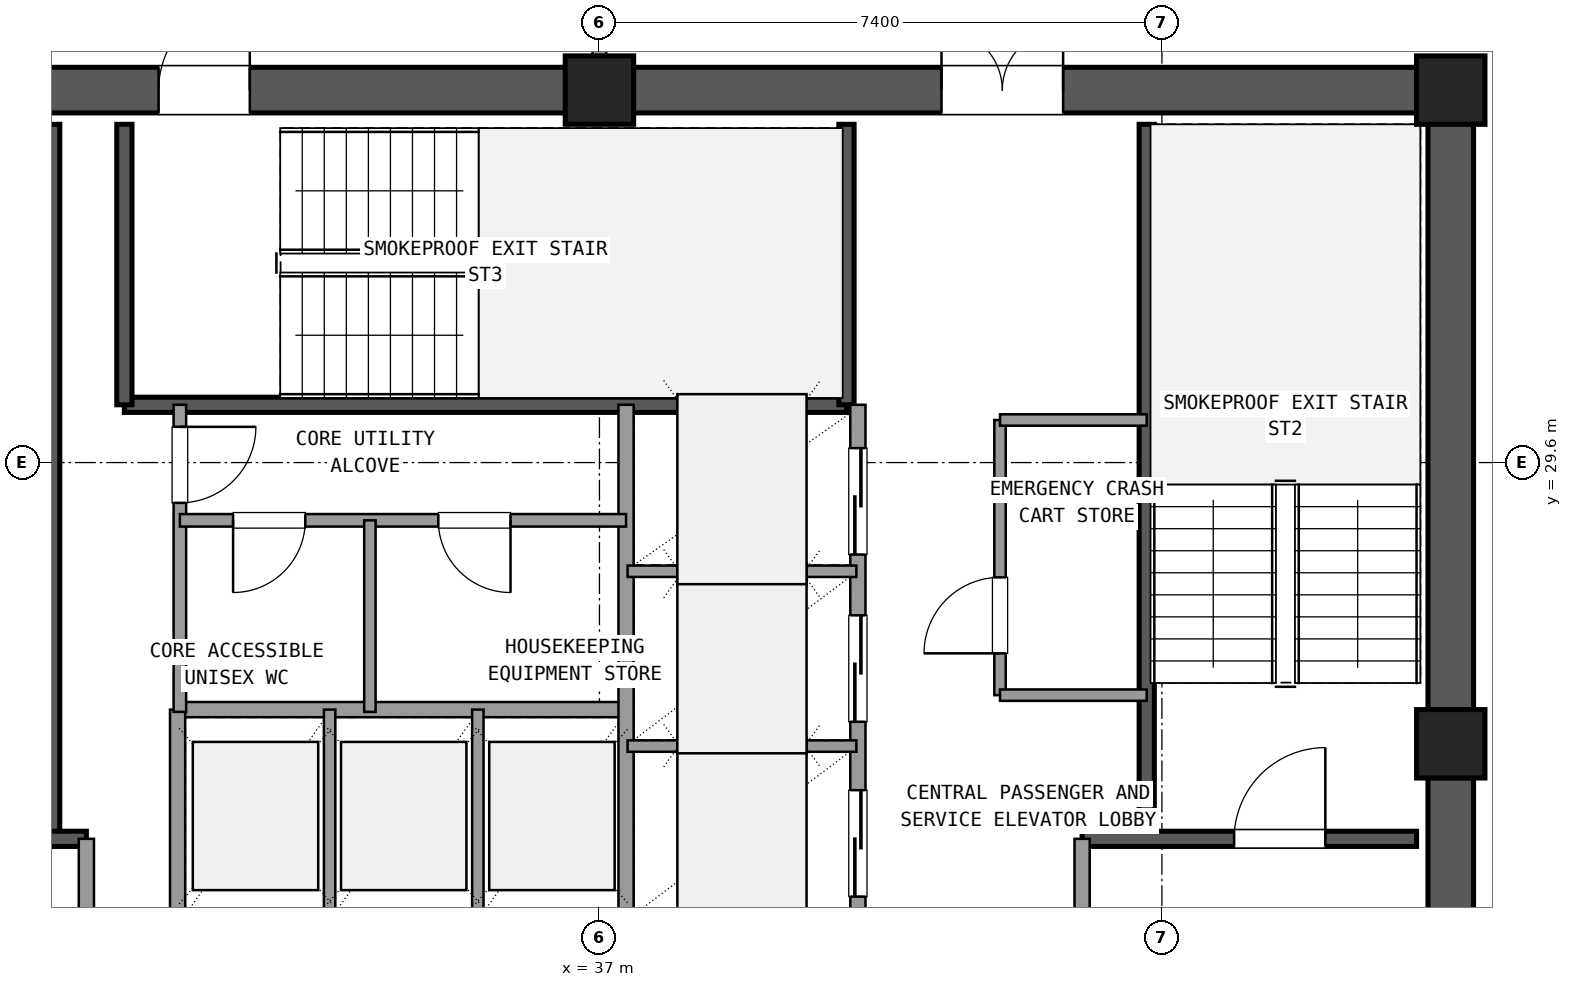
"""IFC4 building model, lengths in metres.
Left out: names, types, materials, properties, quantities, classifications, styles, units other than length and angle.
Written with IfcOpenShell. Run it as: python <this file> out.ifc"""

import sys

from ifc_helpers import new_model, si_unit, direction, frame, frame_2d, origin, origin_2d, place, context, subcontext, project, spatial, rectangle, extrude, element, fill, save


model = new_model("IFC4")
c1 = context("Model", 3, precision=1e-05, world=origin(), true_north=direction((0.0, 1.0)))
c2 = subcontext(c1, "Body", "Model", "MODEL_VIEW")
j1 = project(units=[si_unit("LENGTHUNIT", "METRE"), si_unit("PLANEANGLEUNIT", "RADIAN")], contexts=[c1])
p1 = place(None, origin())
s1 = spatial("IfcSite", under=j1, at=p1, CompositionType="ELEMENT")
p2 = place(p1, origin())
s2 = spatial("IfcBuilding", under=s1, at=p2, CompositionType="ELEMENT")
p3 = place(p2, frame((0.0, 0.0, 196.38)))
s3 = spatial("IfcBuildingStorey", under=s2, at=p3, CompositionType="ELEMENT", Elevation=196.38)
for number, where, z_axis, x_axis in (
    (1, (48.2, 25.9, 0.0), (0.0, 0.0, 1.0), (1.0, 0.0, 0.0)),
    (2, (48.2, 34.5, 0.0), (0.0, 0.0, 1.0), (1.0, 0.0, 0.0)),
    (3, (37.0, 34.5, 0.0), (0.0, 0.0, 1.0), (1.0, 0.0, 0.0)),
):
    element("IfcColumn", number, at=place(p3, frame(where, z_axis=z_axis, x_axis=x_axis)), inside=s3, PredefinedType="COLUMN", context=c2, shape_type="SweptSolid", body=[
        extrude(rectangle(XDim=0.9, YDim=0.9, at=origin_2d()), origin(), (0.0, 0.0, 1.0), 3.6),
    ])
p4 = place(p3, frame((48.2, 17.745, 0.0), z_axis=(0.0, 0.0, 1.0), x_axis=(0.0, 1.0, 0.0)))
e4 = element("IfcWall", 4, at=p4, inside=s3, PredefinedType="SHEAR", context=c2, shape_type="SweptSolid", body=[
    extrude(rectangle(XDim=7.71, YDim=0.6, at=frame_2d((3.855, 0.0))), origin(), (0.0, 0.0, 1.0), 3.32),
])
p5 = place(p4, frame((4.305, 0.0, 0.0)))
e5 = element("IfcOpeningElement", 5, at=p5, cuts=e4, PredefinedType="OPENING", context=c2, shape_type="SweptSolid", body=[
    extrude(rectangle(XDim=1.2, YDim=2.15, at=frame_2d((0.6, 1.075))), frame((0.0, 0.31, 0.0), z_axis=(0.0, -1.0, 0.0), x_axis=(1.0, 0.0, 0.0)), (0.0, 0.0, 1.0), 0.62),
])
p6 = place(p3, frame((48.2, 26.345, 0.0), z_axis=(0.0, 0.0, 1.0), x_axis=(0.0, 1.0, 0.0)))
e6 = element("IfcWall", 6, at=p6, inside=s3, PredefinedType="SHEAR", context=c2, shape_type="SweptSolid", body=[
    extrude(rectangle(XDim=7.71, YDim=0.6, at=frame_2d((3.855, 0.0))), origin(), (0.0, 0.0, 1.0), 3.32),
])
p7 = place(p3, frame((47.755, 34.5, 0.0), z_axis=(0.0, 0.0, 1.0), x_axis=(-1.0, 0.0, 0.0)))
e7 = element("IfcWall", 7, at=p7, inside=s3, PredefinedType="SHEAR", context=c2, shape_type="SweptSolid", body=[
    extrude(rectangle(XDim=10.31, YDim=0.6, at=frame_2d((5.155, 0.0))), origin(), (0.0, 0.0, 1.0), 3.32),
])
p8 = place(p7, frame((4.655, 0.0, 0.0)))
e8 = element("IfcOpeningElement", 8, at=p8, cuts=e7, PredefinedType="OPENING", context=c2, shape_type="SweptSolid", body=[
    extrude(rectangle(XDim=1.6, YDim=2.2, at=frame_2d((0.8, 1.1))), frame((0.0, 0.31, 0.0), z_axis=(0.0, -1.0, 0.0), x_axis=(1.0, 0.0, 0.0)), (0.0, 0.0, 1.0), 0.62),
])
p9 = place(p3, frame((36.555, 34.5, 0.0), z_axis=(0.0, 0.0, 1.0), x_axis=(-1.0, 0.0, 0.0)))
e9 = element("IfcWall", 9, at=p9, inside=s3, PredefinedType="SHEAR", context=c2, shape_type="SweptSolid", body=[
    extrude(rectangle(XDim=10.31, YDim=0.6, at=frame_2d((5.155, 0.0))), origin(), (0.0, 0.0, 1.0), 3.32),
])
p10 = place(p9, frame((4.155, 0.0, 0.0)))
e10 = element("IfcOpeningElement", 10, at=p10, cuts=e9, PredefinedType="OPENING", context=c2, shape_type="SweptSolid", body=[
    extrude(rectangle(XDim=1.2, YDim=2.15, at=frame_2d((0.6, 1.075))), frame((0.0, 0.31, 0.0), z_axis=(0.0, -1.0, 0.0), x_axis=(1.0, 0.0, 0.0)), (0.0, 0.0, 1.0), 0.62),
])
p11 = place(p3, frame((29.8, 24.65, 0.0), z_axis=(0.0, 0.0, 1.0), x_axis=(0.0, 1.0, 0.0)))
e11 = element("IfcWall", 11, at=p11, inside=s3, PredefinedType="SHEAR", context=c2, shape_type="SweptSolid", body=[
    extrude(rectangle(XDim=9.4, YDim=0.2, at=frame_2d((4.7, 0.0))), origin(), (0.0, 0.0, 1.0), 3.32),
])
p12 = place(p3, frame((26.25, 24.65, 0.0), z_axis=(0.0, 0.0, 1.0), x_axis=(1.0, 0.0, 0.0)))
e12 = element("IfcWall", 12, at=p12, inside=s3, PredefinedType="SHEAR", context=c2, shape_type="SweptSolid", body=[
    extrude(rectangle(XDim=4.0, YDim=0.2, at=frame_2d((2.0, 0.0))), origin(), (0.0, 0.0, 1.0), 3.32),
])
p13 = place(p12, frame((1.0, 0.0, 0.0)))
e13 = element("IfcOpeningElement", 13, at=p13, cuts=e12, PredefinedType="OPENING", context=c2, shape_type="SweptSolid", body=[
    extrude(rectangle(XDim=1.2, YDim=2.15, at=frame_2d((0.6, 1.075))), frame((0.0, 0.11, 0.0), z_axis=(0.0, -1.0, 0.0), x_axis=(1.0, 0.0, 0.0)), (0.0, 0.0, 1.0), 0.22),
])
p14 = place(p3, frame((44.2, 24.65, 0.0), z_axis=(0.0, 0.0, 1.0), x_axis=(0.0, 1.0, 0.0)))
e14 = element("IfcWall", 14, at=p14, inside=s3, PredefinedType="SHEAR", context=c2, shape_type="SweptSolid", body=[
    extrude(rectangle(XDim=9.4, YDim=0.2, at=frame_2d((4.7, 0.0))), origin(), (0.0, 0.0, 1.0), 3.32),
])
p15 = place(p3, frame((43.35, 24.65, 0.0), z_axis=(0.0, 0.0, 1.0), x_axis=(1.0, 0.0, 0.0)))
e15 = element("IfcWall", 15, at=p15, inside=s3, PredefinedType="SHEAR", context=c2, shape_type="SweptSolid", body=[
    extrude(rectangle(XDim=4.4, YDim=0.2, at=frame_2d((2.2, 0.0))), origin(), (0.0, 0.0, 1.0), 3.32),
])
p16 = place(p15, frame((2.0, 0.0, 0.0)))
e16 = element("IfcOpeningElement", 16, at=p16, cuts=e15, PredefinedType="OPENING", context=c2, shape_type="SweptSolid", body=[
    extrude(rectangle(XDim=1.2, YDim=2.15, at=frame_2d((0.6, 1.075))), frame((0.0, 0.11, 0.0), z_axis=(0.0, -1.0, 0.0), x_axis=(1.0, 0.0, 0.0)), (0.0, 0.0, 1.0), 0.22),
])
p17 = place(p3, frame((30.75, 30.36, 0.0), z_axis=(0.0, 0.0, 1.0), x_axis=(1.0, 0.0, 0.0)))
e17 = element("IfcWall", 17, at=p17, inside=s3, PredefinedType="SHEAR", context=c2, shape_type="SweptSolid", body=[
    extrude(rectangle(XDim=9.5, YDim=0.2, at=frame_2d((4.75, 0.0))), origin(), (0.0, 0.0, 1.0), 3.32),
])
for number, where, z_axis, x_axis in (
    (18, (30.75, 30.36, 0.0), (0.0, 0.0, 1.0), (0.0, 1.0, 0.0)),
    (19, (40.25, 30.36, 0.0), (0.0, 0.0, 1.0), (0.0, 1.0, 0.0)),
):
    element("IfcWall", number, at=place(p3, frame(where, z_axis=z_axis, x_axis=x_axis)), inside=s3, PredefinedType="SHEAR", context=c2, shape_type="SweptSolid", body=[
        extrude(rectangle(XDim=3.69, YDim=0.2, at=frame_2d((1.845, 0.0))), origin(), (0.0, 0.0, 1.0), 3.32),
    ])
p18 = place(p3, frame((30.25, 17.75, 0.0), z_axis=(0.0, 0.0, 1.0), x_axis=(0.0, 1.0, 0.0)))
e20 = element("IfcWall", 20, at=p18, inside=s3, PredefinedType="SOLIDWALL", context=c2, shape_type="SweptSolid", body=[
    extrude(rectangle(XDim=6.9, YDim=0.2, at=frame_2d((3.45, 0.0))), origin(), (0.0, 0.0, 1.0), 2.61),
])
p19 = place(p18, frame((4.15, 0.0, 0.0)))
e21 = element("IfcOpeningElement", 21, at=p19, cuts=e20, PredefinedType="OPENING", context=c2, shape_type="SweptSolid", body=[
    extrude(rectangle(XDim=1.2, YDim=2.15, at=frame_2d((0.6, 1.075))), frame((0.0, 0.11, 0.0), z_axis=(0.0, -1.0, 0.0), x_axis=(1.0, 0.0, 0.0)), (0.0, 0.0, 1.0), 0.22),
])
p20 = place(p3, frame((43.35, 17.75, 0.0), z_axis=(0.0, 0.0, 1.0), x_axis=(0.0, 1.0, 0.0)))
e22 = element("IfcWall", 22, at=p20, inside=s3, PredefinedType="SOLIDWALL", context=c2, shape_type="SweptSolid", body=[
    extrude(rectangle(XDim=6.9, YDim=0.2, at=frame_2d((3.45, 0.0))), origin(), (0.0, 0.0, 1.0), 2.61),
])
p21 = place(p20, frame((4.15, 0.0, 0.0)))
e23 = element("IfcOpeningElement", 23, at=p21, cuts=e22, PredefinedType="OPENING", context=c2, shape_type="SweptSolid", body=[
    extrude(rectangle(XDim=1.2, YDim=2.15, at=frame_2d((0.6, 1.075))), frame((0.0, 0.11, 0.0), z_axis=(0.0, -1.0, 0.0), x_axis=(1.0, 0.0, 0.0)), (0.0, 0.0, 1.0), 0.22),
])
p22 = place(p3, frame((31.45, 26.35, 0.0), z_axis=(0.0, 0.0, 1.0), x_axis=(1.0, 0.0, 0.0)))
e24 = element("IfcWall", 24, at=p22, inside=s3, PredefinedType="SOLIDWALL", context=c2, shape_type="SweptSolid", body=[
    extrude(rectangle(XDim=5.9, YDim=0.2, at=frame_2d((2.95, 0.0))), origin(), (0.0, 0.0, 1.0), 2.61),
])
p23 = place(p3, frame((31.45, 23.54, 0.0), z_axis=(0.0, 0.0, 1.0), x_axis=(0.0, 1.0, 0.0)))
e25 = element("IfcWall", 25, at=p23, inside=s3, PredefinedType="SOLIDWALL", context=c2, shape_type="SweptSolid", body=[
    extrude(rectangle(XDim=2.81, YDim=0.2, at=frame_2d((1.405, 0.0))), origin(), (0.0, 0.0, 1.0), 2.61),
])
for number, where, z_axis, x_axis in (
    (26, (33.45, 23.54, 0.0), (0.0, 0.0, 1.0), (0.0, 1.0, 0.0)),
    (27, (35.4, 23.54, 0.0), (0.0, 0.0, 1.0), (0.0, 1.0, 0.0)),
):
    element("IfcWall", number, at=place(p3, frame(where, z_axis=z_axis, x_axis=x_axis)), inside=s3, PredefinedType="PARTITIONING", context=c2, shape_type="SweptSolid", body=[
        extrude(rectangle(XDim=2.81, YDim=0.15, at=frame_2d((1.405, 0.0))), origin(), (0.0, 0.0, 1.0), 2.61),
    ])
p24 = place(p3, frame((37.35, 23.54, 0.0), z_axis=(0.0, 0.0, 1.0), x_axis=(0.0, 1.0, 0.0)))
e28 = element("IfcWall", 28, at=p24, inside=s3, PredefinedType="SOLIDWALL", context=c2, shape_type="SweptSolid", body=[
    extrude(rectangle(XDim=6.82, YDim=0.2, at=frame_2d((3.41, 0.0))), origin(), (0.0, 0.0, 1.0), 2.61),
])
p25 = place(p3, frame((40.4, 23.54, 0.0), z_axis=(0.0, 0.0, 1.0), x_axis=(0.0, 1.0, 0.0)))
e29 = element("IfcWall", 29, at=p25, inside=s3, PredefinedType="SOLIDWALL", context=c2, shape_type="SweptSolid", body=[
    extrude(rectangle(XDim=6.82, YDim=0.2, at=frame_2d((3.41, 0.0))), origin(), (0.0, 0.0, 1.0), 2.61),
])
p26 = place(p25, frame((0.35, 0.0, 0.0)))
e30 = element("IfcOpeningElement", 30, at=p26, cuts=e29, PredefinedType="OPENING", context=c2, shape_type="SweptSolid", body=[
    extrude(rectangle(XDim=1.4, YDim=2.2, at=frame_2d((0.7, 1.1))), frame((0.0, 0.11, 0.0), z_axis=(0.0, -1.0, 0.0), x_axis=(1.0, 0.0, 0.0)), (0.0, 0.0, 1.0), 0.22),
])
p27 = place(p25, frame((2.65, 0.0, 0.0)))
e31 = element("IfcOpeningElement", 31, at=p27, cuts=e29, PredefinedType="OPENING", context=c2, shape_type="SweptSolid", body=[
    extrude(rectangle(XDim=1.4, YDim=2.2, at=frame_2d((0.7, 1.1))), frame((0.0, 0.11, 0.0), z_axis=(0.0, -1.0, 0.0), x_axis=(1.0, 0.0, 0.0)), (0.0, 0.0, 1.0), 0.22),
])
p28 = place(p25, frame((4.85, 0.0, 0.0)))
e32 = element("IfcOpeningElement", 32, at=p28, cuts=e29, PredefinedType="OPENING", context=c2, shape_type="SweptSolid", body=[
    extrude(rectangle(XDim=1.4, YDim=2.2, at=frame_2d((0.7, 1.1))), frame((0.0, 0.11, 0.0), z_axis=(0.0, -1.0, 0.0), x_axis=(1.0, 0.0, 0.0)), (0.0, 0.0, 1.0), 0.22),
])
for number, where, z_axis, x_axis in (
    (33, (37.37, 25.87, 0.0), (0.0, 0.0, 1.0), (1.0, 0.0, 0.0)),
    (34, (37.37, 28.17, 0.0), (0.0, 0.0, 1.0), (1.0, 0.0, 0.0)),
):
    element("IfcWall", number, at=place(p3, frame(where, z_axis=z_axis, x_axis=x_axis)), inside=s3, PredefinedType="PARTITIONING", context=c2, shape_type="SweptSolid", body=[
        extrude(rectangle(XDim=3.01, YDim=0.15, at=frame_2d((1.505, 0.0))), origin(), (0.0, 0.0, 1.0), 2.61),
    ])
p29 = place(p3, frame((42.27, 26.54, 0.0), z_axis=(0.0, 0.0, 1.0), x_axis=(0.0, 1.0, 0.0)))
e35 = element("IfcWall", 35, at=p29, inside=s3, PredefinedType="PARTITIONING", context=c2, shape_type="SweptSolid", body=[
    extrude(rectangle(XDim=3.62, YDim=0.15, at=frame_2d((1.81, 0.0))), origin(), (0.0, 0.0, 1.0), 2.61),
])
p30 = place(p29, frame((0.55, 0.0, 0.0)))
e36 = element("IfcOpeningElement", 36, at=p30, cuts=e35, PredefinedType="OPENING", context=c2, shape_type="SweptSolid", body=[
    extrude(rectangle(XDim=1.0, YDim=2.15, at=frame_2d((0.5, 1.075))), frame((0.0, 0.085, 0.0), z_axis=(0.0, -1.0, 0.0), x_axis=(1.0, 0.0, 0.0)), (0.0, 0.0, 1.0), 0.17),
])
for number, where, z_axis, x_axis in (
    (37, (42.27, 26.54, 0.0), (0.0, 0.0, 1.0), (1.0, 0.0, 0.0)),
    (38, (42.27, 30.16, 0.0), (0.0, 0.0, 1.0), (1.0, 0.0, 0.0)),
):
    element("IfcWall", number, at=place(p3, frame(where, z_axis=z_axis, x_axis=x_axis)), inside=s3, PredefinedType="PARTITIONING", context=c2, shape_type="SweptSolid", body=[
        extrude(rectangle(XDim=1.93, YDim=0.15, at=frame_2d((0.965, 0.0))), origin(), (0.0, 0.0, 1.0), 2.61),
    ])
p31 = place(p3, frame((31.48, 26.32, 0.0), z_axis=(0.0, 0.0, 1.0), x_axis=(0.0, 1.0, 0.0)))
e39 = element("IfcWall", 39, at=p31, inside=s3, PredefinedType="PLUMBINGWALL", context=c2, shape_type="SweptSolid", body=[
    extrude(rectangle(XDim=4.04, YDim=0.165, at=frame_2d((2.02, 0.0))), origin(), (0.0, 0.0, 1.0), 2.61),
])
p32 = place(p31, frame((2.75, 0.0, 0.0)))
e40 = element("IfcOpeningElement", 40, at=p32, cuts=e39, PredefinedType="OPENING", context=c2, shape_type="SweptSolid", body=[
    extrude(rectangle(XDim=1.0, YDim=2.15, at=frame_2d((0.5, 1.075))), frame((0.0, 0.093, 0.0), z_axis=(0.0, -1.0, 0.0), x_axis=(1.0, 0.0, 0.0)), (0.0, 0.0, 1.0), 0.185),
])
p33 = place(p3, frame((31.48, 28.84, 0.0), z_axis=(0.0, 0.0, 1.0), x_axis=(1.0, 0.0, 0.0)))
e41 = element("IfcWall", 41, at=p33, inside=s3, PredefinedType="PLUMBINGWALL", context=c2, shape_type="SweptSolid", body=[
    extrude(rectangle(XDim=5.87, YDim=0.165, at=frame_2d((2.935, 0.0))), origin(), (0.0, 0.0, 1.0), 2.61),
])
p34 = place(p33, frame((0.7, 0.0, 0.0)))
e42 = element("IfcOpeningElement", 42, at=p34, cuts=e41, PredefinedType="OPENING", context=c2, shape_type="SweptSolid", body=[
    extrude(rectangle(XDim=0.95, YDim=2.1, at=frame_2d((0.475, 1.05))), frame((0.0, 0.093, 0.0), z_axis=(0.0, -1.0, 0.0), x_axis=(1.0, 0.0, 0.0)), (0.0, 0.0, 1.0), 0.185),
])
p35 = place(p33, frame((3.4, 0.0, 0.0)))
e43 = element("IfcOpeningElement", 43, at=p35, cuts=e41, PredefinedType="OPENING", context=c2, shape_type="SweptSolid", body=[
    extrude(rectangle(XDim=0.95, YDim=2.1, at=frame_2d((0.475, 1.05))), frame((0.0, 0.093, 0.0), z_axis=(0.0, -1.0, 0.0), x_axis=(1.0, 0.0, 0.0)), (0.0, 0.0, 1.0), 0.185),
])
p36 = place(p3, frame((33.98, 26.32, 0.0), z_axis=(0.0, 0.0, 1.0), x_axis=(0.0, 1.0, 0.0)))
e44 = element("IfcWall", 44, at=p36, inside=s3, PredefinedType="PARTITIONING", context=c2, shape_type="SweptSolid", body=[
    extrude(rectangle(XDim=2.52, YDim=0.15, at=frame_2d((1.26, 0.0))), origin(), (0.0, 0.0, 1.0), 2.61),
])
p37 = place(p3, frame((37.0, 34.95, 0.0), z_axis=(0.0, 0.0, 1.0), x_axis=(0.0, 1.0, 0.0)))
e45 = element("IfcWall", 45, at=p37, inside=s3, PredefinedType="PARTITIONING", context=c2, shape_type="SweptSolid", body=[
    extrude(rectangle(XDim=2.7, YDim=0.18, at=frame_2d((1.35, 0.0))), origin(), (0.0, 0.0, 1.0), 2.61),
])
p38 = place(p37, frame((0.35, 0.0, 0.0)))
e46 = element("IfcOpeningElement", 46, at=p38, cuts=e45, PredefinedType="OPENING", context=c2, shape_type="SweptSolid", body=[
    extrude(rectangle(XDim=2.0, YDim=2.2, at=frame_2d((1.0, 1.1))), frame((0.0, 0.1, 0.0), z_axis=(0.0, -1.0, 0.0), x_axis=(1.0, 0.0, 0.0)), (0.0, 0.0, 1.0), 0.2),
])
p39 = place(p16, origin())
e47 = element("IfcDoor", 47, at=p39, inside=s3, OperationType="SINGLE_SWING_RIGHT", PredefinedType="DOOR", context=c2, shape_type="SweptSolid", body=[
    extrude(rectangle(XDim=1.2, YDim=2.15, at=frame_2d((0.6, 1.075))), frame((0.0, 0.025, 0.0), z_axis=(0.0, -1.0, 0.0), x_axis=(1.0, 0.0, 0.0)), (0.0, 0.0, 1.0), 0.05),
])
fill(e16, e47)
p40 = place(p8, frame((1.6, 0.0, 0.0), z_axis=(0.0, 0.0, 1.0), x_axis=(-1.0, 0.0, 0.0)))
e48 = element("IfcDoor", 48, at=p40, inside=s3, OperationType="DOUBLE_DOOR_SINGLE_SWING", PredefinedType="DOOR", context=c2, shape_type="SweptSolid", body=[
    extrude(rectangle(XDim=1.6, YDim=2.2, at=frame_2d((0.8, 1.1))), frame((0.0, 0.025, 0.0), z_axis=(0.0, -1.0, 0.0), x_axis=(1.0, 0.0, 0.0)), (0.0, 0.0, 1.0), 0.05),
])
fill(e8, e48)
p41 = place(p10, frame((1.2, 0.0, 0.0), z_axis=(0.0, 0.0, 1.0), x_axis=(-1.0, 0.0, 0.0)))
e49 = element("IfcDoor", 49, at=p41, inside=s3, OperationType="SINGLE_SWING_LEFT", PredefinedType="DOOR", context=c2, shape_type="SweptSolid", body=[
    extrude(rectangle(XDim=1.2, YDim=2.15, at=frame_2d((0.6, 1.075))), frame((0.0, 0.025, 0.0), z_axis=(0.0, -1.0, 0.0), x_axis=(1.0, 0.0, 0.0)), (0.0, 0.0, 1.0), 0.05),
])
fill(e10, e49)
p42 = place(p26, origin())
e50 = element("IfcDoor", 50, at=p42, inside=s3, OperationType="SLIDING_TO_LEFT", PredefinedType="DOOR", context=c2, shape_type="SweptSolid", body=[
    extrude(rectangle(XDim=1.4, YDim=2.2, at=frame_2d((0.7, 1.1))), frame((0.0, 0.025, 0.0), z_axis=(0.0, -1.0, 0.0), x_axis=(1.0, 0.0, 0.0)), (0.0, 0.0, 1.0), 0.05),
])
fill(e30, e50)
p43 = place(p27, origin())
e51 = element("IfcDoor", 51, at=p43, inside=s3, OperationType="SLIDING_TO_LEFT", PredefinedType="DOOR", context=c2, shape_type="SweptSolid", body=[
    extrude(rectangle(XDim=1.4, YDim=2.2, at=frame_2d((0.7, 1.1))), frame((0.0, 0.025, 0.0), z_axis=(0.0, -1.0, 0.0), x_axis=(1.0, 0.0, 0.0)), (0.0, 0.0, 1.0), 0.05),
])
fill(e31, e51)
p44 = place(p28, origin())
e52 = element("IfcDoor", 52, at=p44, inside=s3, OperationType="SLIDING_TO_RIGHT", PredefinedType="DOOR", context=c2, shape_type="SweptSolid", body=[
    extrude(rectangle(XDim=1.4, YDim=2.2, at=frame_2d((0.7, 1.1))), frame((0.0, 0.025, 0.0), z_axis=(0.0, -1.0, 0.0), x_axis=(1.0, 0.0, 0.0)), (0.0, 0.0, 1.0), 0.05),
])
fill(e32, e52)
p45 = place(p30, origin())
e53 = element("IfcDoor", 53, at=p45, inside=s3, OperationType="SINGLE_SWING_LEFT", PredefinedType="DOOR", context=c2, shape_type="SweptSolid", body=[
    extrude(rectangle(XDim=1.0, YDim=2.15, at=frame_2d((0.5, 1.075))), frame((0.0, 0.025, 0.0), z_axis=(0.0, -1.0, 0.0), x_axis=(1.0, 0.0, 0.0)), (0.0, 0.0, 1.0), 0.05),
])
fill(e36, e53)
p46 = place(p32, frame((1.0, 0.0, 0.0), z_axis=(0.0, 0.0, 1.0), x_axis=(-1.0, 0.0, 0.0)))
e54 = element("IfcDoor", 54, at=p46, inside=s3, OperationType="SINGLE_SWING_RIGHT", PredefinedType="DOOR", context=c2, shape_type="SweptSolid", body=[
    extrude(rectangle(XDim=1.0, YDim=2.15, at=frame_2d((0.5, 1.075))), frame((0.0, 0.025, 0.0), z_axis=(0.0, -1.0, 0.0), x_axis=(1.0, 0.0, 0.0)), (0.0, 0.0, 1.0), 0.05),
])
fill(e40, e54)
p47 = place(p34, frame((0.95, 0.0, 0.0), z_axis=(0.0, 0.0, 1.0), x_axis=(-1.0, 0.0, 0.0)))
e55 = element("IfcDoor", 55, at=p47, inside=s3, OperationType="SINGLE_SWING_LEFT", PredefinedType="DOOR", context=c2, shape_type="SweptSolid", body=[
    extrude(rectangle(XDim=0.95, YDim=2.1, at=frame_2d((0.475, 1.05))), frame((0.0, 0.025, 0.0), z_axis=(0.0, -1.0, 0.0), x_axis=(1.0, 0.0, 0.0)), (0.0, 0.0, 1.0), 0.05),
])
fill(e42, e55)
p48 = place(p35, frame((0.95, 0.0, 0.0), z_axis=(0.0, 0.0, 1.0), x_axis=(-1.0, 0.0, 0.0)))
e56 = element("IfcDoor", 56, at=p48, inside=s3, OperationType="SINGLE_SWING_RIGHT", PredefinedType="DOOR", context=c2, shape_type="SweptSolid", body=[
    extrude(rectangle(XDim=0.95, YDim=2.1, at=frame_2d((0.475, 1.05))), frame((0.0, 0.025, 0.0), z_axis=(0.0, -1.0, 0.0), x_axis=(1.0, 0.0, 0.0)), (0.0, 0.0, 1.0), 0.05),
])
fill(e43, e56)
save(model, sys.argv[1])
